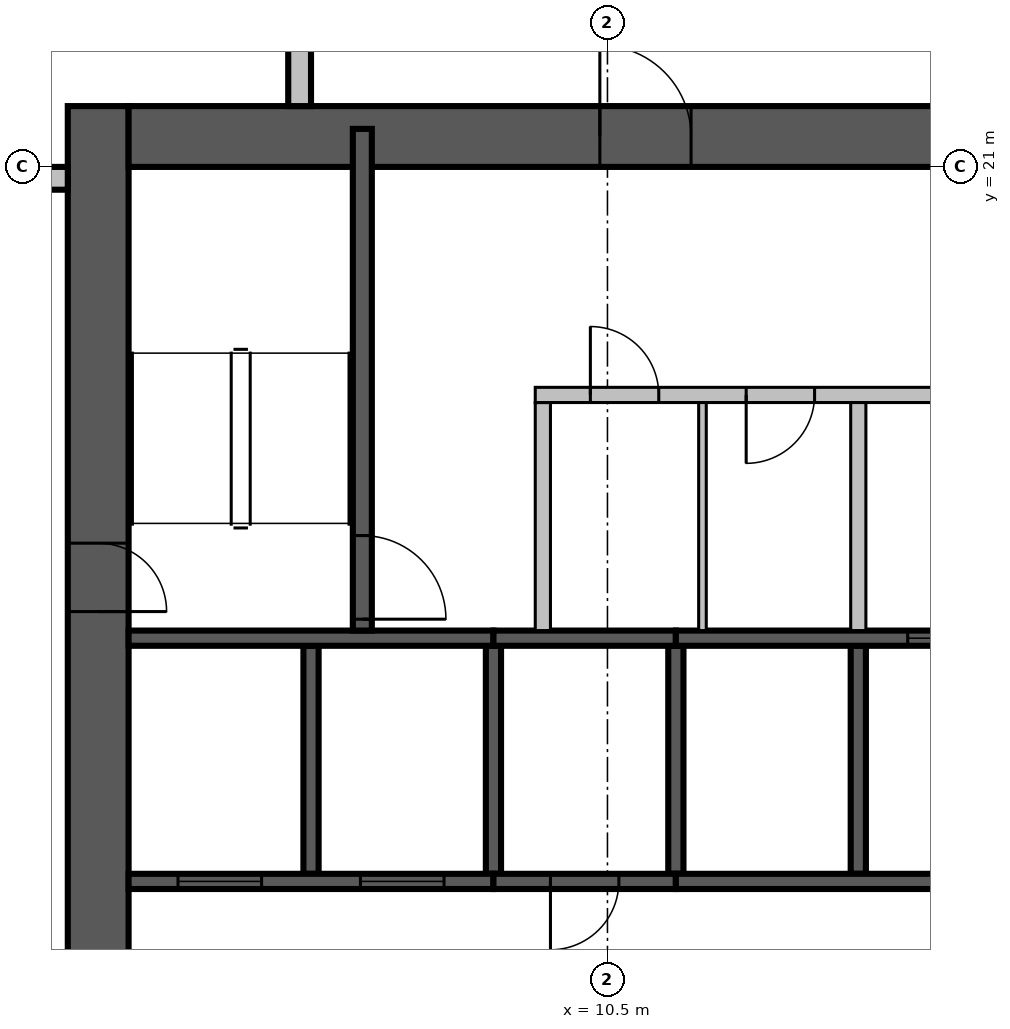
"""IFC4 building model, lengths in metres.
Left out: names, types, materials, properties, quantities, classifications, styles, units other than length and angle.
Written with IfcOpenShell. Run it as: python <this file> out.ifc"""

import sys

from ifc_helpers import new_model, si_unit, direction, frame, frame_2d, origin, place, context, subcontext, project, spatial, rectangle, extrude, source, transform, mapped, element, fill, save


model = new_model("IFC4")
c1 = context("Model", 3, precision=1e-05, world=origin(), true_north=direction((0.0, 1.0)))
c2 = subcontext(c1, "Body", "Model", "MODEL_VIEW")
j1 = project(units=[si_unit("LENGTHUNIT", "METRE"), si_unit("PLANEANGLEUNIT", "RADIAN")], contexts=[c1])
p1 = place(None, origin())
s1 = spatial("IfcSite", under=j1, at=p1, CompositionType="ELEMENT")
p2 = place(p1, origin())
s2 = spatial("IfcBuilding", under=s1, at=p2, CompositionType="ELEMENT")
p3 = place(p2, frame((0.0, 0.0, 250.0)))
s3 = spatial("IfcBuildingStorey", under=s2, at=p3, CompositionType="ELEMENT", Elevation=250.0)
m1 = source(origin(), c2, "Body", "SweptSolid", [
    extrude(rectangle(XDim=17.6, YDim=0.8, at=frame_2d((8.8, 0.0))), origin(), (0.0, 0.0, 1.0), 3.8),
])
p4 = place(p3, frame((3.8, 4.2, 0.0), z_axis=(0.0, 0.0, 1.0), x_axis=(0.0, 1.0, 0.0)))
e1 = element("IfcWall", 1, at=p4, inside=s3, PredefinedType="SHEAR", context=c2, shape_type="MappedRepresentation", body=[
    mapped(m1, transform((0.0, 0.0, 0.0), scale=1.0)),
])
m2 = source(origin(), c2, "Body", "SweptSolid", [
    extrude(rectangle(XDim=2.2, YDim=2.1, at=frame_2d((1.1, 1.05))), frame((0.0, 0.41, 0.0), z_axis=(0.0, -1.0, 0.0), x_axis=(1.0, 0.0, 0.0)), (0.0, 0.0, 1.0), 0.82),
])
p5 = place(p4, frame((4.2, 0.0, 0.0)))
e2 = element("IfcOpeningElement", 2, at=p5, cuts=e1, PredefinedType="OPENING", context=c2, shape_type="MappedRepresentation", body=[
    mapped(m2, transform((0.0, 0.0, 0.0), scale=1.0)),
])
m3 = source(origin(), c2, "Body", "SweptSolid", [
    extrude(rectangle(XDim=0.9, YDim=2.1, at=frame_2d((0.45, 1.05))), frame((0.0, 0.41, 0.0), z_axis=(0.0, -1.0, 0.0), x_axis=(1.0, 0.0, 0.0)), (0.0, 0.0, 1.0), 0.82),
])
p6 = place(p4, frame((10.95, 0.0, 0.0)))
e3 = element("IfcOpeningElement", 3, at=p6, cuts=e1, PredefinedType="OPENING", context=c2, shape_type="MappedRepresentation", body=[
    mapped(m3, transform((0.0, 0.0, 0.0), scale=1.0)),
])
m4 = source(origin(), c2, "Body", "SweptSolid", [
    extrude(rectangle(XDim=16.8, YDim=0.8, at=frame_2d((8.4, 0.0))), origin(), (0.0, 0.0, 1.0), 3.8),
])
p7 = place(p3, frame((4.2, 21.4, 0.0), z_axis=(0.0, 0.0, 1.0), x_axis=(1.0, 0.0, 0.0)))
e4 = element("IfcWall", 4, at=p7, inside=s3, PredefinedType="SHEAR", context=c2, shape_type="MappedRepresentation", body=[
    mapped(m4, transform((0.0, 0.0, 0.0), scale=1.0)),
])
m5 = source(origin(), c2, "Body", "SweptSolid", [
    extrude(rectangle(XDim=1.2, YDim=2.1, at=frame_2d((0.6, 1.05))), frame((0.0, 0.41, 0.0), z_axis=(0.0, -1.0, 0.0), x_axis=(1.0, 0.0, 0.0)), (0.0, 0.0, 1.0), 0.82),
])
p8 = place(p7, frame((6.2, 0.0, 0.0)))
e5 = element("IfcOpeningElement", 5, at=p8, cuts=e4, PredefinedType="OPENING", context=c2, shape_type="MappedRepresentation", body=[
    mapped(m5, transform((0.0, 0.0, 0.0), scale=1.0)),
])
m6 = source(origin(), c2, "Body", "SweptSolid", [
    extrude(rectangle(XDim=16.6, YDim=0.3, at=frame_2d((8.3, 0.0))), origin(), (0.0, 0.0, 1.0), 2.9),
])
p9 = place(p3, frame((6.45, 38.4, 0.0), z_axis=(0.0, 0.0, 1.0), x_axis=(0.0, -1.0, 0.0)))
e6 = element("IfcWall", 6, at=p9, inside=s3, PredefinedType="STANDARD", context=c2, shape_type="MappedRepresentation", body=[
    mapped(m6, transform((0.0, 0.0, 0.0), scale=1.0)),
])
m7 = source(origin(), c2, "Body", "SweptSolid", [
    extrude(rectangle(XDim=1.8, YDim=2.3, at=frame_2d((0.9, 1.15))), frame((0.0, 0.16, 0.0), z_axis=(0.0, -1.0, 0.0), x_axis=(1.0, 0.0, 0.0)), (0.0, 0.0, 1.0), 0.32),
])
p10 = place(p9, frame((1.15, 0.0, 0.6)))
e7 = element("IfcOpeningElement", 7, at=p10, cuts=e6, PredefinedType="OPENING", context=c2, shape_type="MappedRepresentation", body=[
    mapped(m7, transform((0.0, 0.0, 0.0), scale=1.0)),
])
m8 = source(origin(), c2, "Body", "SweptSolid", [
    extrude(rectangle(XDim=2.4, YDim=2.3, at=frame_2d((1.2, 1.15))), frame((0.0, 0.16, 0.0), z_axis=(0.0, -1.0, 0.0), x_axis=(1.0, 0.0, 0.0)), (0.0, 0.0, 1.0), 0.32),
])
p11 = place(p9, frame((4.75, 0.0, 0.6)))
e8 = element("IfcOpeningElement", 8, at=p11, cuts=e6, PredefinedType="OPENING", context=c2, shape_type="MappedRepresentation", body=[
    mapped(m8, transform((0.0, 0.0, 0.0), scale=1.0)),
])
p12 = place(p9, frame((9.438, 0.0, 0.6)))
e9 = element("IfcOpeningElement", 9, at=p12, cuts=e6, PredefinedType="OPENING", context=c2, shape_type="MappedRepresentation", body=[
    mapped(m7, transform((0.0, 0.0, 0.0), scale=1.0)),
])
m9 = source(origin(), c2, "Body", "SweptSolid", [
    extrude(rectangle(XDim=3.0, YDim=2.3, at=frame_2d((1.5, 1.15))), frame((0.0, 0.16, 0.0), z_axis=(0.0, -1.0, 0.0), x_axis=(1.0, 0.0, 0.0)), (0.0, 0.0, 1.0), 0.32),
])
p13 = place(p9, frame((12.7, 0.0, 0.6)))
e10 = element("IfcOpeningElement", 10, at=p13, cuts=e6, PredefinedType="OPENING", context=c2, shape_type="MappedRepresentation", body=[
    mapped(m9, transform((0.0, 0.0, 0.0), scale=1.0)),
])
m10 = source(origin(), c2, "Body", "SweptSolid", [
    extrude(rectangle(XDim=2.6, YDim=0.3, at=frame_2d((1.3, 0.0))), origin(), (0.0, 0.0, 1.0), 3.4),
])
p14 = place(p3, frame((3.4, 20.85, 0.0), z_axis=(0.0, 0.0, 1.0), x_axis=(-1.0, 0.0, 0.0)))
e11 = element("IfcWall", 11, at=p14, inside=s3, PredefinedType="STANDARD", context=c2, shape_type="MappedRepresentation", body=[
    mapped(m10, transform((0.0, 0.0, 0.0), scale=1.0)),
])
p15 = place(p14, frame((0.4, 0.0, 0.6)))
e12 = element("IfcOpeningElement", 12, at=p15, cuts=e11, PredefinedType="OPENING", context=c2, shape_type="MappedRepresentation", body=[
    mapped(m7, transform((0.0, 0.0, 0.0), scale=1.0)),
])
m11 = source(origin(), c2, "Body", "SweptSolid", [
    extrude(rectangle(XDim=3.0, YDim=0.2, at=frame_2d((1.5, 0.0))), origin(), (0.0, 0.0, 1.0), 3.8),
])
p16 = place(p3, frame((6.6, 11.7, 0.0), z_axis=(0.0, 0.0, 1.0), x_axis=(0.0, 1.0, 0.0)))
e13 = element("IfcWall", 13, at=p16, inside=s3, PredefinedType="SOLIDWALL", context=c2, shape_type="MappedRepresentation", body=[
    mapped(m11, transform((0.0, 0.0, 0.0), scale=1.0)),
])
m12 = source(origin(), c2, "Body", "SweptSolid", [
    extrude(rectangle(XDim=3.0, YDim=0.2, at=frame_2d((1.5, 0.0))), origin(), (0.0, 0.0, 1.0), 3.4),
])
for number, where, z_axis, x_axis in (
    (14, (9.0, 11.7, 0.0), (0.0, 0.0, 1.0), (0.0, 1.0, 0.0)),
    (15, (11.4, 11.7, 0.0), (0.0, 0.0, 1.0), (0.0, 1.0, 0.0)),
):
    element("IfcWall", number, at=place(p3, frame(where, z_axis=z_axis, x_axis=x_axis)), inside=s3, PredefinedType="SOLIDWALL", context=c2, shape_type="MappedRepresentation", body=[
        mapped(m12, transform((0.0, 0.0, 0.0), scale=1.0)),
    ])
p17 = place(p3, frame((13.8, 11.7, 0.0), z_axis=(0.0, 0.0, 1.0), x_axis=(0.0, 1.0, 0.0)))
e16 = element("IfcWall", 16, at=p17, inside=s3, PredefinedType="SOLIDWALL", context=c2, shape_type="MappedRepresentation", body=[
    mapped(m11, transform((0.0, 0.0, 0.0), scale=1.0)),
])
m13 = source(origin(), c2, "Body", "SweptSolid", [
    extrude(rectangle(XDim=4.8, YDim=0.2, at=frame_2d((2.4, 0.0))), origin(), (0.0, 0.0, 1.0), 3.8),
])
p18 = place(p3, frame((4.2, 11.6, 0.0), z_axis=(0.0, 0.0, 1.0), x_axis=(1.0, 0.0, 0.0)))
e17 = element("IfcWall", 17, at=p18, inside=s3, PredefinedType="SOLIDWALL", context=c2, shape_type="MappedRepresentation", body=[
    mapped(m13, transform((0.0, 0.0, 0.0), scale=1.0)),
])
m14 = source(origin(), c2, "Body", "SweptSolid", [
    extrude(rectangle(XDim=1.1, YDim=2.1, at=frame_2d((0.55, 1.05))), frame((0.0, 0.11, 0.0), z_axis=(0.0, -1.0, 0.0), x_axis=(1.0, 0.0, 0.0)), (0.0, 0.0, 1.0), 0.22),
])
p19 = place(p18, frame((0.65, 0.0, 0.0)))
e18 = element("IfcOpeningElement", 18, at=p19, cuts=e17, PredefinedType="OPENING", context=c2, shape_type="MappedRepresentation", body=[
    mapped(m14, transform((0.0, 0.0, 0.0), scale=1.0)),
])
p20 = place(p18, frame((3.05, 0.0, 0.0)))
e19 = element("IfcOpeningElement", 19, at=p20, cuts=e17, PredefinedType="OPENING", context=c2, shape_type="MappedRepresentation", body=[
    mapped(m14, transform((0.0, 0.0, 0.0), scale=1.0)),
])
m15 = source(origin(), c2, "Body", "SweptSolid", [
    extrude(rectangle(XDim=2.4, YDim=0.2, at=frame_2d((1.2, 0.0))), origin(), (0.0, 0.0, 1.0), 3.4),
])
p21 = place(p3, frame((9.0, 11.6, 0.0), z_axis=(0.0, 0.0, 1.0), x_axis=(1.0, 0.0, 0.0)))
e20 = element("IfcWall", 20, at=p21, inside=s3, PredefinedType="SOLIDWALL", context=c2, shape_type="MappedRepresentation", body=[
    mapped(m15, transform((0.0, 0.0, 0.0), scale=1.0)),
])
m16 = source(origin(), c2, "Body", "SweptSolid", [
    extrude(rectangle(XDim=0.9, YDim=2.1, at=frame_2d((0.45, 1.05))), frame((0.0, 0.11, 0.0), z_axis=(0.0, -1.0, 0.0), x_axis=(1.0, 0.0, 0.0)), (0.0, 0.0, 1.0), 0.22),
])
p22 = place(p21, frame((0.75, 0.0, 0.0)))
e21 = element("IfcOpeningElement", 21, at=p22, cuts=e20, PredefinedType="OPENING", context=c2, shape_type="MappedRepresentation", body=[
    mapped(m16, transform((0.0, 0.0, 0.0), scale=1.0)),
])
m17 = source(origin(), c2, "Body", "SweptSolid", [
    extrude(rectangle(XDim=9.6, YDim=0.2, at=frame_2d((4.8, 0.0))), origin(), (0.0, 0.0, 1.0), 3.8),
])
p23 = place(p3, frame((11.4, 11.6, 0.0), z_axis=(0.0, 0.0, 1.0), x_axis=(1.0, 0.0, 0.0)))
e22 = element("IfcWall", 22, at=p23, inside=s3, PredefinedType="SOLIDWALL", context=c2, shape_type="MappedRepresentation", body=[
    mapped(m17, transform((0.0, 0.0, 0.0), scale=1.0)),
])
p24 = place(p3, frame((4.2, 14.8, 0.0), z_axis=(0.0, 0.0, 1.0), x_axis=(1.0, 0.0, 0.0)))
e23 = element("IfcWall", 23, at=p24, inside=s3, PredefinedType="SOLIDWALL", context=c2, shape_type="MappedRepresentation", body=[
    mapped(m13, transform((0.0, 0.0, 0.0), scale=1.0)),
])
p25 = place(p3, frame((9.0, 14.8, 0.0), z_axis=(0.0, 0.0, 1.0), x_axis=(1.0, 0.0, 0.0)))
e24 = element("IfcWall", 24, at=p25, inside=s3, PredefinedType="SOLIDWALL", context=c2, shape_type="MappedRepresentation", body=[
    mapped(m15, transform((0.0, 0.0, 0.0), scale=1.0)),
])
p26 = place(p3, frame((11.4, 14.8, 0.0), z_axis=(0.0, 0.0, 1.0), x_axis=(1.0, 0.0, 0.0)))
e25 = element("IfcWall", 25, at=p26, inside=s3, PredefinedType="SOLIDWALL", context=c2, shape_type="MappedRepresentation", body=[
    mapped(m17, transform((0.0, 0.0, 0.0), scale=1.0)),
])
p27 = place(p26, frame((3.05, 0.0, 0.0)))
e26 = element("IfcOpeningElement", 26, at=p27, cuts=e25, PredefinedType="OPENING", context=c2, shape_type="MappedRepresentation", body=[
    mapped(m14, transform((0.0, 0.0, 0.0), scale=1.0)),
])
p28 = place(p26, frame((5.45, 0.0, 0.0)))
e27 = element("IfcOpeningElement", 27, at=p28, cuts=e25, PredefinedType="OPENING", context=c2, shape_type="MappedRepresentation", body=[
    mapped(m14, transform((0.0, 0.0, 0.0), scale=1.0)),
])
p29 = place(p26, frame((7.85, 0.0, 0.0)))
e28 = element("IfcOpeningElement", 28, at=p29, cuts=e25, PredefinedType="OPENING", context=c2, shape_type="MappedRepresentation", body=[
    mapped(m14, transform((0.0, 0.0, 0.0), scale=1.0)),
])
m18 = source(origin(), c2, "Body", "SweptSolid", [
    extrude(rectangle(XDim=6.6, YDim=0.25, at=frame_2d((3.3, 0.0))), origin(), (0.0, 0.0, 1.0), 3.4),
])
p30 = place(p3, frame((7.275, 14.9, 0.0), z_axis=(0.0, 0.0, 1.0), x_axis=(0.0, 1.0, 0.0)))
e29 = element("IfcWall", 29, at=p30, inside=s3, PredefinedType="SOLIDWALL", context=c2, shape_type="MappedRepresentation", body=[
    mapped(m18, transform((0.0, 0.0, 0.0), scale=1.0)),
])
m19 = source(origin(), c2, "Body", "SweptSolid", [
    extrude(rectangle(XDim=1.1, YDim=2.1, at=frame_2d((0.55, 1.05))), frame((0.0, 0.135, 0.0), z_axis=(0.0, -1.0, 0.0), x_axis=(1.0, 0.0, 0.0)), (0.0, 0.0, 1.0), 0.27),
])
p31 = place(p30, frame((0.15, 0.0, 0.0)))
e30 = element("IfcOpeningElement", 30, at=p31, cuts=e29, PredefinedType="OPENING", context=c2, shape_type="MappedRepresentation", body=[
    mapped(m19, transform((0.0, 0.0, 0.0), scale=1.0)),
])
m20 = source(origin(), c2, "Body", "SweptSolid", [
    extrude(rectangle(XDim=3.0, YDim=0.2, at=frame_2d((1.5, 0.0))), origin(), (0.0, 0.0, 1.0), 3.4),
])
p32 = place(p3, frame((9.65, 14.9, 0.0), z_axis=(0.0, 0.0, 1.0), x_axis=(0.0, 1.0, 0.0)))
e31 = element("IfcWall", 31, at=p32, inside=s3, PredefinedType="PARTITIONING", context=c2, shape_type="MappedRepresentation", body=[
    mapped(m20, transform((0.0, 0.0, 0.0), scale=1.0)),
])
m21 = source(origin(), c2, "Body", "SweptSolid", [
    extrude(rectangle(XDim=11.45, YDim=0.2, at=frame_2d((5.725, 0.0))), origin(), (0.0, 0.0, 1.0), 3.4),
])
p33 = place(p3, frame((9.55, 18.0, 0.0), z_axis=(0.0, 0.0, 1.0), x_axis=(1.0, 0.0, 0.0)))
e32 = element("IfcWall", 32, at=p33, inside=s3, PredefinedType="PARTITIONING", context=c2, shape_type="MappedRepresentation", body=[
    mapped(m21, transform((0.0, 0.0, 0.0), scale=1.0)),
])
p34 = place(p33, frame((0.725, 0.0, 0.0)))
e33 = element("IfcOpeningElement", 33, at=p34, cuts=e32, PredefinedType="OPENING", context=c2, shape_type="MappedRepresentation", body=[
    mapped(m16, transform((0.0, 0.0, 0.0), scale=1.0)),
])
p35 = place(p33, frame((2.775, 0.0, 0.0)))
e34 = element("IfcOpeningElement", 34, at=p35, cuts=e32, PredefinedType="OPENING", context=c2, shape_type="MappedRepresentation", body=[
    mapped(m16, transform((0.0, 0.0, 0.0), scale=1.0)),
])
p36 = place(p33, frame((7.35, 0.0, 0.0)))
e35 = element("IfcOpeningElement", 35, at=p36, cuts=e32, PredefinedType="OPENING", context=c2, shape_type="MappedRepresentation", body=[
    mapped(m14, transform((0.0, 0.0, 0.0), scale=1.0)),
])
p37 = place(p3, frame((13.8, 14.9, 0.0), z_axis=(0.0, 0.0, 1.0), x_axis=(0.0, 1.0, 0.0)))
e36 = element("IfcWall", 36, at=p37, inside=s3, PredefinedType="PARTITIONING", context=c2, shape_type="MappedRepresentation", body=[
    mapped(m20, transform((0.0, 0.0, 0.0), scale=1.0)),
])
m22 = source(origin(), c2, "Body", "SweptSolid", [
    extrude(rectangle(XDim=3.0, YDim=0.1, at=frame_2d((1.5, 0.0))), origin(), (0.0, 0.0, 1.0), 3.4),
])
p38 = place(p3, frame((11.75, 14.9, 0.0), z_axis=(0.0, 0.0, 1.0), x_axis=(0.0, 1.0, 0.0)))
e37 = element("IfcWall", 37, at=p38, inside=s3, PredefinedType="PARTITIONING", context=c2, shape_type="MappedRepresentation", body=[
    mapped(m22, transform((0.0, 0.0, 0.0), scale=1.0)),
])
m23 = source(origin(), c2, "Body", "SweptSolid", [
    extrude(rectangle(XDim=1.1, YDim=2.1, at=frame_2d((0.55, 1.05))), frame((0.0, 0.025, 0.0), z_axis=(0.0, -1.0, 0.0), x_axis=(1.0, 0.0, 0.0)), (0.0, 0.0, 1.0), 0.05),
])
p39 = place(p19, origin())
e38 = element("IfcDoor", 38, at=p39, inside=s3, OperationType="SLIDING_TO_LEFT", PredefinedType="DOOR", context=c2, shape_type="MappedRepresentation", body=[
    mapped(m23, transform((0.0, 0.0, 0.0), scale=1.0)),
])
fill(e18, e38)
p40 = place(p20, origin())
e39 = element("IfcDoor", 39, at=p40, inside=s3, OperationType="SLIDING_TO_LEFT", PredefinedType="DOOR", context=c2, shape_type="MappedRepresentation", body=[
    mapped(m23, transform((0.0, 0.0, 0.0), scale=1.0)),
])
fill(e19, e39)
m24 = source(origin(), c2, "Body", "SweptSolid", [
    extrude(rectangle(XDim=0.9, YDim=2.1, at=frame_2d((0.45, 1.05))), frame((0.0, 0.025, 0.0), z_axis=(0.0, -1.0, 0.0), x_axis=(1.0, 0.0, 0.0)), (0.0, 0.0, 1.0), 0.05),
])
p41 = place(p22, origin())
e40 = element("IfcDoor", 40, at=p41, inside=s3, OperationType="SINGLE_SWING_RIGHT", PredefinedType="DOOR", context=c2, shape_type="MappedRepresentation", body=[
    mapped(m24, transform((0.0, 0.0, 0.0), scale=1.0)),
])
fill(e21, e40)
p42 = place(p27, origin())
e41 = element("IfcDoor", 41, at=p42, inside=s3, OperationType="SLIDING_TO_LEFT", PredefinedType="DOOR", context=c2, shape_type="MappedRepresentation", body=[
    mapped(m23, transform((0.0, 0.0, 0.0), scale=1.0)),
])
fill(e26, e41)
p43 = place(p31, origin())
e42 = element("IfcDoor", 42, at=p43, inside=s3, OperationType="SINGLE_SWING_RIGHT", PredefinedType="DOOR", context=c2, shape_type="MappedRepresentation", body=[
    mapped(m23, transform((0.0, 0.0, 0.0), scale=1.0)),
])
fill(e30, e42)
p44 = place(p34, origin())
e43 = element("IfcDoor", 43, at=p44, inside=s3, OperationType="SINGLE_SWING_LEFT", PredefinedType="DOOR", context=c2, shape_type="MappedRepresentation", body=[
    mapped(m24, transform((0.0, 0.0, 0.0), scale=1.0)),
])
fill(e33, e43)
p45 = place(p35, origin())
e44 = element("IfcDoor", 44, at=p45, inside=s3, OperationType="SINGLE_SWING_RIGHT", PredefinedType="DOOR", context=c2, shape_type="MappedRepresentation", body=[
    mapped(m24, transform((0.0, 0.0, 0.0), scale=1.0)),
])
fill(e34, e44)
m25 = source(origin(), c2, "Body", "SweptSolid", [
    extrude(rectangle(XDim=1.2, YDim=2.1, at=frame_2d((0.6, 1.05))), frame((0.0, 0.025, 0.0), z_axis=(0.0, -1.0, 0.0), x_axis=(1.0, 0.0, 0.0)), (0.0, 0.0, 1.0), 0.05),
])
p46 = place(p8, origin())
e45 = element("IfcDoor", 45, at=p46, inside=s3, OperationType="SINGLE_SWING_LEFT", PredefinedType="DOOR", context=c2, shape_type="MappedRepresentation", body=[
    mapped(m25, transform((0.0, 0.0, 0.0), scale=1.0)),
])
fill(e5, e45)
p47 = place(p6, origin())
e46 = element("IfcDoor", 46, at=p47, inside=s3, OperationType="SINGLE_SWING_RIGHT", PredefinedType="DOOR", context=c2, shape_type="MappedRepresentation", body=[
    mapped(m24, transform((0.0, 0.0, 0.0), scale=1.0)),
])
fill(e3, e46)
save(model, sys.argv[1])
